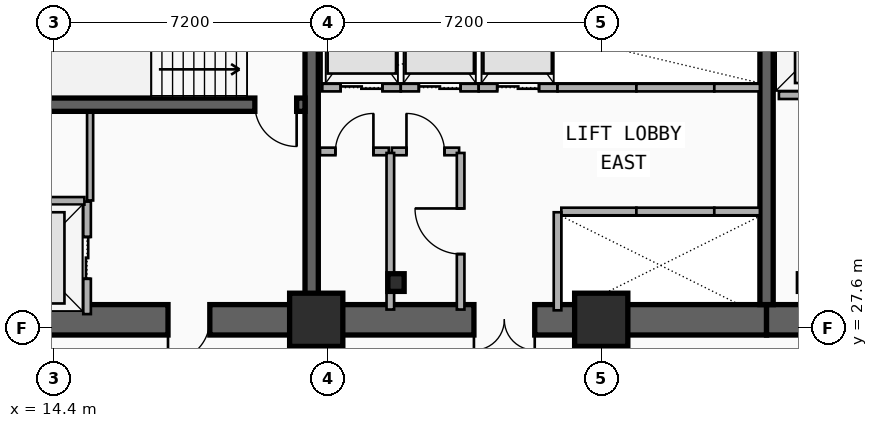
"""IFC4 building model, lengths in metres.
Left out: names, types, materials, properties, quantities, classifications, styles, units other than length and angle.
Written with IfcOpenShell. Run it as: python <this file> out.ifc"""

import sys

from ifc_helpers import new_model, si_unit, direction, frame, frame_2d, origin, origin_2d, place, context, subcontext, project, spatial, rectangle, i_section, extrude, element, fill, save


model = new_model("IFC4")
c1 = context("Model", 3, precision=1e-05, world=origin(), true_north=direction((0.0, 1.0)))
c2 = subcontext(c1, "Body", "Model", "MODEL_VIEW")
j1 = project(units=[si_unit("LENGTHUNIT", "METRE"), si_unit("PLANEANGLEUNIT", "RADIAN")], contexts=[c1])
p1 = place(None, origin())
s1 = spatial("IfcSite", under=j1, at=p1, CompositionType="ELEMENT")
p2 = place(p1, origin())
s2 = spatial("IfcBuilding", under=s1, at=p2, CompositionType="ELEMENT")
p3 = place(p2, frame((0.0, 0.0, 32.5)))
s3 = spatial("IfcBuildingStorey", under=s2, at=p3, CompositionType="ELEMENT", Elevation=32.5)
p4 = place(p3, frame((21.18, 27.82, 0.0), z_axis=(0.0, 0.0, 1.0), x_axis=(-1.0, 0.0, 0.0)))
e1 = element("IfcWall", 1, at=p4, inside=s3, PredefinedType="SHEAR", context=c2, shape_type="SweptSolid", body=[
    extrude(rectangle(XDim=9.03, YDim=0.8, at=frame_2d((4.515, 0.0))), origin(), (0.0, 0.0, 1.0), 3.5),
])
p5 = place(p4, frame((2.68, 0.0, 0.0)))
e2 = element("IfcOpeningElement", 2, at=p5, cuts=e1, PredefinedType="OPENING", context=c2, shape_type="SweptSolid", body=[
    extrude(rectangle(XDim=1.1, YDim=2.15, at=frame_2d((0.55, 1.075))), frame((0.0, 0.41, 0.0), z_axis=(0.0, -1.0, 0.0), x_axis=(1.0, 0.0, 0.0)), (0.0, 0.0, 1.0), 0.82),
])
p6 = place(p3, frame((33.15, 27.82, 0.0), z_axis=(0.0, 0.0, 1.0), x_axis=(-1.0, 0.0, 0.0)))
e3 = element("IfcWall", 3, at=p6, inside=s3, PredefinedType="SHEAR", context=c2, shape_type="SweptSolid", body=[
    extrude(rectangle(XDim=11.97, YDim=0.8, at=frame_2d((5.985, 0.0))), origin(), (0.0, 0.0, 1.0), 3.5),
])
p7 = place(p6, frame((6.1, 0.0, 0.0)))
e4 = element("IfcOpeningElement", 4, at=p7, cuts=e3, PredefinedType="OPENING", context=c2, shape_type="SweptSolid", body=[
    extrude(rectangle(XDim=1.6, YDim=2.2, at=frame_2d((0.8, 1.1))), frame((0.0, 0.41, 0.0), z_axis=(0.0, -1.0, 0.0), x_axis=(1.0, 0.0, 0.0)), (0.0, 0.0, 1.0), 0.82),
])
p8 = place(p3, frame((45.38, 27.82, 0.0), z_axis=(0.0, 0.0, 1.0), x_axis=(-1.0, 0.0, 0.0)))
e5 = element("IfcWall", 5, at=p8, inside=s3, PredefinedType="SHEAR", context=c2, shape_type="SweptSolid", body=[
    extrude(rectangle(XDim=12.23, YDim=0.8, at=frame_2d((6.115, 0.0))), origin(), (0.0, 0.0, 1.0), 3.5),
])
p9 = place(p8, frame((9.93, 0.0, 0.0)))
e6 = element("IfcOpeningElement", 6, at=p9, cuts=e5, PredefinedType="OPENING", context=c2, shape_type="SweptSolid", body=[
    extrude(rectangle(XDim=1.1, YDim=2.15, at=frame_2d((0.55, 1.075))), frame((0.0, 0.41, 0.0), z_axis=(0.0, -1.0, 0.0), x_axis=(1.0, 0.0, 0.0)), (0.0, 0.0, 1.0), 0.82),
])
p10 = place(p8, frame((6.23, 0.0, 0.0)))
e7 = element("IfcOpeningElement", 7, at=p10, cuts=e5, PredefinedType="OPENING", context=c2, shape_type="SweptSolid", body=[
    extrude(rectangle(XDim=1.1, YDim=2.15, at=frame_2d((0.55, 1.075))), frame((0.0, 0.41, 0.0), z_axis=(0.0, -1.0, 0.0), x_axis=(1.0, 0.0, 0.0)), (0.0, 0.0, 1.0), 0.82),
])
for number, where, z_axis, x_axis in (
    (8, (21.18, 28.22, 0.0), (0.0, 0.0, 1.0), (0.0, 1.0, 0.0)),
    (9, (33.15, 28.22, 0.0), (0.0, 0.0, 1.0), (0.0, 1.0, 0.0)),
):
    element("IfcWall", number, at=place(p3, frame(where, z_axis=z_axis, x_axis=x_axis)), inside=s3, PredefinedType="SHEAR", context=c2, shape_type="SweptSolid", body=[
        extrude(rectangle(XDim=8.43, YDim=0.35, at=frame_2d((4.215, 0.0))), origin(), (0.0, 0.0, 1.0), 3.5),
    ])
p11 = place(p3, frame((21.005, 33.48, 0.0), z_axis=(0.0, 0.0, 1.0), x_axis=(-1.0, 0.0, 0.0)))
e10 = element("IfcWall", 10, at=p11, inside=s3, PredefinedType="SHEAR", context=c2, shape_type="SweptSolid", body=[
    extrude(rectangle(XDim=8.455, YDim=0.35, at=frame_2d((4.228, 0.0))), origin(), (0.0, 0.0, 1.0), 3.5),
])
p12 = place(p11, frame((0.22, 0.0, 0.0)))
e11 = element("IfcOpeningElement", 11, at=p12, cuts=e10, PredefinedType="OPENING", context=c2, shape_type="SweptSolid", body=[
    extrude(rectangle(XDim=1.1, YDim=2.15, at=frame_2d((0.55, 1.075))), frame((0.0, 0.185, 0.0), z_axis=(0.0, -1.0, 0.0), x_axis=(1.0, 0.0, 0.0)), (0.0, 0.0, 1.0), 0.37),
])
p13 = place(p3, frame((23.4, 28.8, 0.0), z_axis=(0.0, 0.0, 1.0), x_axis=(1.0, 0.0, 0.0)))
e12 = element("IfcColumn", 12, at=p13, inside=s3, PredefinedType="COLUMN", context=c2, shape_type="SweptSolid", body=[
    extrude(i_section(OverallWidth=0.428, OverallDepth=0.465, WebThickness=0.045, FlangeThickness=0.073, FilletRadius=0.015, at=origin_2d()), origin(), (0.0, 0.0, 1.0), 3.5),
])
for number, where, z_axis, x_axis in (
    (13, (21.3, 27.82, 0.0), (0.0, 0.0, 1.0), (1.0, 0.0, 0.0)),
    (14, (28.8, 27.82, 0.0), (0.0, 0.0, 1.0), (1.0, 0.0, 0.0)),
):
    element("IfcColumn", number, at=place(p3, frame(where, z_axis=z_axis, x_axis=x_axis)), inside=s3, PredefinedType="COLUMN", context=c2, shape_type="SweptSolid", body=[
        extrude(rectangle(XDim=1.4, YDim=1.4, at=origin_2d()), origin(), (0.0, 0.0, 1.0), 3.5),
    ])
p14 = place(p3, frame((15.27, 27.97, 0.0), z_axis=(0.0, 0.0, 1.0), x_axis=(0.0, 1.0, 0.0)))
e15 = element("IfcWall", 15, at=p14, inside=s3, PredefinedType="PARTITIONING", context=c2, shape_type="SweptSolid", body=[
    extrude(rectangle(XDim=2.96, YDim=0.2, at=frame_2d((1.48, 0.0))), origin(), (0.0, 0.0, 1.0), 2.212),
])
p15 = place(p14, frame((0.93, 0.0, 0.0)))
e16 = element("IfcOpeningElement", 16, at=p15, cuts=e15, PredefinedType="OPENING", context=c2, shape_type="SweptSolid", body=[
    extrude(rectangle(XDim=1.1, YDim=2.15, at=frame_2d((0.55, 1.075))), frame((0.0, 0.11, 0.0), z_axis=(0.0, -1.0, 0.0), x_axis=(1.0, 0.0, 0.0)), (0.0, 0.0, 1.0), 0.22),
])
p16 = place(p3, frame((12.45, 30.95, 0.0), z_axis=(0.0, 0.0, 1.0), x_axis=(1.0, 0.0, 0.0)))
e17 = element("IfcWall", 17, at=p16, inside=s3, PredefinedType="PARTITIONING", context=c2, shape_type="SweptSolid", body=[
    extrude(rectangle(XDim=2.75, YDim=0.2, at=frame_2d((1.375, 0.0))), origin(), (0.0, 0.0, 1.0), 2.212),
])
p17 = place(p3, frame((33.475, 33.73, 0.0), z_axis=(0.0, 0.0, 1.0), x_axis=(1.0, 0.0, 0.0)))
e18 = element("IfcWall", 18, at=p17, inside=s3, PredefinedType="PARTITIONING", context=c2, shape_type="SweptSolid", body=[
    extrude(rectangle(XDim=2.725, YDim=0.2, at=frame_2d((1.362, 0.0))), origin(), (0.0, 0.0, 1.0), 2.212),
])
p18 = place(p17, frame((0.812, 0.0, 0.0)))
e19 = element("IfcOpeningElement", 19, at=p18, cuts=e18, PredefinedType="OPENING", context=c2, shape_type="SweptSolid", body=[
    extrude(rectangle(XDim=1.1, YDim=2.15, at=frame_2d((0.55, 1.075))), frame((0.0, 0.11, 0.0), z_axis=(0.0, -1.0, 0.0), x_axis=(1.0, 0.0, 0.0)), (0.0, 0.0, 1.0), 0.22),
])
p19 = place(p3, frame((27.75, 30.67, 0.0), z_axis=(0.0, 0.0, 1.0), x_axis=(1.0, 0.0, 0.0)))
e20 = element("IfcWall", 20, at=p19, inside=s3, PredefinedType="PARTITIONING", context=c2, shape_type="SweptSolid", body=[
    extrude(rectangle(XDim=1.975, YDim=0.2, at=frame_2d((0.988, 0.0))), origin(), (0.0, 0.0, 1.0), 2.212),
])
p20 = place(p3, frame((27.65, 28.07, 0.0), z_axis=(0.0, 0.0, 1.0), x_axis=(0.0, 1.0, 0.0)))
e21 = element("IfcWall", 21, at=p20, inside=s3, PredefinedType="PARTITIONING", context=c2, shape_type="SweptSolid", body=[
    extrude(rectangle(XDim=2.58, YDim=0.2, at=frame_2d((1.29, 0.0))), origin(), (0.0, 0.0, 1.0), 2.212),
])
p21 = place(p3, frame((29.725, 30.67, 0.0), z_axis=(0.0, 0.0, 1.0), x_axis=(1.0, 0.0, 0.0)))
e22 = element("IfcWall", 22, at=p21, inside=s3, PredefinedType="PARTITIONING", context=c2, shape_type="SweptSolid", body=[
    extrude(rectangle(XDim=2.05, YDim=0.2, at=frame_2d((1.025, 0.0))), origin(), (0.0, 0.0, 1.0), 2.62),
])
p22 = place(p3, frame((31.775, 30.67, 0.0), z_axis=(0.0, 0.0, 1.0), x_axis=(1.0, 0.0, 0.0)))
e23 = element("IfcWall", 23, at=p22, inside=s3, PredefinedType="PARTITIONING", context=c2, shape_type="SweptSolid", body=[
    extrude(rectangle(XDim=1.2, YDim=0.2, at=frame_2d((0.6, 0.0))), origin(), (0.0, 0.0, 1.0), 2.62),
])
p23 = place(p3, frame((21.46, 33.93, 0.0), z_axis=(0.0, 0.0, 1.0), x_axis=(1.0, 0.0, 0.0)))
e24 = element("IfcWall", 24, at=p23, inside=s3, PredefinedType="PARTITIONING", context=c2, shape_type="SweptSolid", body=[
    extrude(rectangle(XDim=2.065, YDim=0.2, at=frame_2d((1.032, 0.0))), origin(), (0.0, 0.0, 1.0), 2.212),
])
p24 = place(p23, frame((0.482, 0.0, 0.0)))
e25 = element("IfcOpeningElement", 25, at=p24, cuts=e24, PredefinedType="OPENING", context=c2, shape_type="SweptSolid", body=[
    extrude(rectangle(XDim=1.1, YDim=2.15, at=frame_2d((0.55, 1.075))), frame((0.0, 0.11, 0.0), z_axis=(0.0, -1.0, 0.0), x_axis=(1.0, 0.0, 0.0)), (0.0, 0.0, 1.0), 0.22),
])
p25 = place(p3, frame((23.525, 33.93, 0.0), z_axis=(0.0, 0.0, 1.0), x_axis=(1.0, 0.0, 0.0)))
e26 = element("IfcWall", 26, at=p25, inside=s3, PredefinedType="PARTITIONING", context=c2, shape_type="SweptSolid", body=[
    extrude(rectangle(XDim=2.05, YDim=0.2, at=frame_2d((1.025, 0.0))), origin(), (0.0, 0.0, 1.0), 3.24),
])
p26 = place(p25, frame((0.475, 0.0, 0.0)))
e27 = element("IfcOpeningElement", 27, at=p26, cuts=e26, PredefinedType="OPENING", context=c2, shape_type="SweptSolid", body=[
    extrude(rectangle(XDim=1.1, YDim=2.15, at=frame_2d((0.55, 1.075))), frame((0.0, 0.11, 0.0), z_axis=(0.0, -1.0, 0.0), x_axis=(1.0, 0.0, 0.0)), (0.0, 0.0, 1.0), 0.22),
])
p27 = place(p3, frame((25.575, 33.93, 0.0), z_axis=(0.0, 0.0, 1.0), x_axis=(1.0, 0.0, 0.0)))
e28 = element("IfcWall", 28, at=p27, inside=s3, PredefinedType="PARTITIONING", context=c2, shape_type="SweptSolid", body=[
    extrude(rectangle(XDim=2.075, YDim=0.2, at=frame_2d((1.038, 0.0))), origin(), (0.0, 0.0, 1.0), 3.24),
])
p28 = place(p27, frame((0.488, 0.0, 0.0)))
e29 = element("IfcOpeningElement", 29, at=p28, cuts=e28, PredefinedType="OPENING", context=c2, shape_type="SweptSolid", body=[
    extrude(rectangle(XDim=1.1, YDim=2.15, at=frame_2d((0.55, 1.075))), frame((0.0, 0.11, 0.0), z_axis=(0.0, -1.0, 0.0), x_axis=(1.0, 0.0, 0.0)), (0.0, 0.0, 1.0), 0.22),
])
p29 = place(p3, frame((27.65, 33.93, 0.0), z_axis=(0.0, 0.0, 1.0), x_axis=(1.0, 0.0, 0.0)))
e30 = element("IfcWall", 30, at=p29, inside=s3, PredefinedType="PARTITIONING", context=c2, shape_type="SweptSolid", body=[
    extrude(rectangle(XDim=2.075, YDim=0.2, at=frame_2d((1.038, 0.0))), origin(), (0.0, 0.0, 1.0), 2.212),
])
p30 = place(p3, frame((29.725, 33.93, 0.0), z_axis=(0.0, 0.0, 1.0), x_axis=(1.0, 0.0, 0.0)))
e31 = element("IfcWall", 31, at=p30, inside=s3, PredefinedType="PARTITIONING", context=c2, shape_type="SweptSolid", body=[
    extrude(rectangle(XDim=2.05, YDim=0.2, at=frame_2d((1.025, 0.0))), origin(), (0.0, 0.0, 1.0), 3.24),
])
p31 = place(p3, frame((31.775, 33.93, 0.0), z_axis=(0.0, 0.0, 1.0), x_axis=(1.0, 0.0, 0.0)))
e32 = element("IfcWall", 32, at=p31, inside=s3, PredefinedType="PARTITIONING", context=c2, shape_type="SweptSolid", body=[
    extrude(rectangle(XDim=1.2, YDim=0.2, at=frame_2d((0.6, 0.0))), origin(), (0.0, 0.0, 1.0), 3.24),
])
p32 = place(p3, frame((21.4, 32.25, 0.0), z_axis=(0.0, 0.0, 1.0), x_axis=(1.0, 0.0, 0.0)))
e33 = element("IfcWall", 33, at=p32, inside=s3, PredefinedType="PARTITIONING", context=c2, shape_type="SweptSolid", body=[
    extrude(rectangle(XDim=1.81, YDim=0.2, at=frame_2d((0.905, 0.0))), origin(), (0.0, 0.0, 1.0), 2.28),
])
p33 = place(p32, frame((0.405, 0.0, 0.0)))
e34 = element("IfcOpeningElement", 34, at=p33, cuts=e33, PredefinedType="OPENING", context=c2, shape_type="SweptSolid", body=[
    extrude(rectangle(XDim=1.0, YDim=2.15, at=frame_2d((0.5, 1.075))), frame((0.0, 0.11, 0.0), z_axis=(0.0, -1.0, 0.0), x_axis=(1.0, 0.0, 0.0)), (0.0, 0.0, 1.0), 0.22),
])
p34 = place(p3, frame((23.29, 32.25, 0.0), z_axis=(0.0, 0.0, 1.0), x_axis=(1.0, 0.0, 0.0)))
e35 = element("IfcWall", 35, at=p34, inside=s3, PredefinedType="PARTITIONING", context=c2, shape_type="SweptSolid", body=[
    extrude(rectangle(XDim=1.77, YDim=0.2, at=frame_2d((0.885, 0.0))), origin(), (0.0, 0.0, 1.0), 3.24),
])
p35 = place(p34, frame((0.385, 0.0, 0.0)))
e36 = element("IfcOpeningElement", 36, at=p35, cuts=e35, PredefinedType="OPENING", context=c2, shape_type="SweptSolid", body=[
    extrude(rectangle(XDim=1.0, YDim=2.15, at=frame_2d((0.5, 1.075))), frame((0.0, 0.11, 0.0), z_axis=(0.0, -1.0, 0.0), x_axis=(1.0, 0.0, 0.0)), (0.0, 0.0, 1.0), 0.22),
])
p36 = place(p3, frame((25.1, 28.09, 0.0), z_axis=(0.0, 0.0, 1.0), x_axis=(0.0, 1.0, 0.0)))
e37 = element("IfcWall", 37, at=p36, inside=s3, PredefinedType="PARTITIONING", context=c2, shape_type="SweptSolid", body=[
    extrude(rectangle(XDim=4.12, YDim=0.2, at=frame_2d((2.06, 0.0))), origin(), (0.0, 0.0, 1.0), 2.62),
])
p37 = place(p36, frame((1.46, 0.0, 0.0)))
e38 = element("IfcOpeningElement", 38, at=p37, cuts=e37, PredefinedType="OPENING", context=c2, shape_type="SweptSolid", body=[
    extrude(rectangle(XDim=1.2, YDim=2.15, at=frame_2d((0.6, 1.075))), frame((0.0, 0.11, 0.0), z_axis=(0.0, -1.0, 0.0), x_axis=(1.0, 0.0, 0.0)), (0.0, 0.0, 1.0), 0.22),
])
p38 = place(p3, frame((23.25, 28.09, 0.0), z_axis=(0.0, 0.0, 1.0), x_axis=(0.0, 1.0, 0.0)))
e39 = element("IfcWall", 39, at=p38, inside=s3, PredefinedType="PARTITIONING", context=c2, shape_type="SweptSolid", body=[
    extrude(rectangle(XDim=4.12, YDim=0.2, at=frame_2d((2.06, 0.0))), origin(), (0.0, 0.0, 1.0), 2.62),
])
p39 = place(p3, frame((15.35, 30.96, 0.0), z_axis=(0.0, 0.0, 1.0), x_axis=(0.0, 1.0, 0.0)))
e40 = element("IfcWall", 40, at=p39, inside=s3, PredefinedType="PARTITIONING", context=c2, shape_type="SweptSolid", body=[
    extrude(rectangle(XDim=2.31, YDim=0.16, at=frame_2d((1.155, 0.0))), origin(), (0.0, 0.0, 1.0), 3.24),
])
p40 = place(p15, origin())
e41 = element("IfcDoor", 41, at=p40, inside=s3, OperationType="DOUBLE_DOOR_SLIDING", PredefinedType="DOOR", context=c2, shape_type="SweptSolid", body=[
    extrude(rectangle(XDim=1.1, YDim=2.15, at=frame_2d((0.55, 1.075))), frame((0.0, 0.025, 0.0), z_axis=(0.0, -1.0, 0.0), x_axis=(1.0, 0.0, 0.0)), (0.0, 0.0, 1.0), 0.05),
])
fill(e16, e41)
p41 = place(p24, origin())
e42 = element("IfcDoor", 42, at=p41, inside=s3, OperationType="DOUBLE_DOOR_SLIDING", PredefinedType="DOOR", context=c2, shape_type="SweptSolid", body=[
    extrude(rectangle(XDim=1.1, YDim=2.15, at=frame_2d((0.55, 1.075))), frame((0.0, 0.025, 0.0), z_axis=(0.0, -1.0, 0.0), x_axis=(1.0, 0.0, 0.0)), (0.0, 0.0, 1.0), 0.05),
])
fill(e25, e42)
p42 = place(p26, origin())
e43 = element("IfcDoor", 43, at=p42, inside=s3, OperationType="DOUBLE_DOOR_SLIDING", PredefinedType="DOOR", context=c2, shape_type="SweptSolid", body=[
    extrude(rectangle(XDim=1.1, YDim=2.15, at=frame_2d((0.55, 1.075))), frame((0.0, 0.025, 0.0), z_axis=(0.0, -1.0, 0.0), x_axis=(1.0, 0.0, 0.0)), (0.0, 0.0, 1.0), 0.05),
])
fill(e27, e43)
p43 = place(p28, origin())
e44 = element("IfcDoor", 44, at=p43, inside=s3, OperationType="DOUBLE_DOOR_SLIDING", PredefinedType="DOOR", context=c2, shape_type="SweptSolid", body=[
    extrude(rectangle(XDim=1.1, YDim=2.15, at=frame_2d((0.55, 1.075))), frame((0.0, 0.025, 0.0), z_axis=(0.0, -1.0, 0.0), x_axis=(1.0, 0.0, 0.0)), (0.0, 0.0, 1.0), 0.05),
])
fill(e29, e44)
p44 = place(p12, origin())
e45 = element("IfcDoor", 45, at=p44, inside=s3, OperationType="SINGLE_SWING_LEFT", PredefinedType="DOOR", context=c2, shape_type="SweptSolid", body=[
    extrude(rectangle(XDim=1.1, YDim=2.15, at=frame_2d((0.55, 1.075))), frame((0.0, 0.025, 0.0), z_axis=(0.0, -1.0, 0.0), x_axis=(1.0, 0.0, 0.0)), (0.0, 0.0, 1.0), 0.05),
])
fill(e11, e45)
p45 = place(p5, origin())
e46 = element("IfcDoor", 46, at=p45, inside=s3, OperationType="SINGLE_SWING_RIGHT", PredefinedType="DOOR", context=c2, shape_type="SweptSolid", body=[
    extrude(rectangle(XDim=1.1, YDim=2.15, at=frame_2d((0.55, 1.075))), frame((0.0, 0.025, 0.0), z_axis=(0.0, -1.0, 0.0), x_axis=(1.0, 0.0, 0.0)), (0.0, 0.0, 1.0), 0.05),
])
fill(e2, e46)
p46 = place(p7, origin())
e47 = element("IfcDoor", 47, at=p46, inside=s3, OperationType="SINGLE_SWING_LEFT", PredefinedType="DOOR", context=c2, shape_type="SweptSolid", body=[
    extrude(rectangle(XDim=1.6, YDim=2.2, at=frame_2d((0.8, 1.1))), frame((0.0, 0.025, 0.0), z_axis=(0.0, -1.0, 0.0), x_axis=(1.0, 0.0, 0.0)), (0.0, 0.0, 1.0), 0.05),
])
fill(e4, e47)
p47 = place(p33, origin())
e48 = element("IfcDoor", 48, at=p47, inside=s3, OperationType="SINGLE_SWING_RIGHT", PredefinedType="DOOR", context=c2, shape_type="SweptSolid", body=[
    extrude(rectangle(XDim=1.0, YDim=2.15, at=frame_2d((0.5, 1.075))), frame((0.0, 0.025, 0.0), z_axis=(0.0, -1.0, 0.0), x_axis=(1.0, 0.0, 0.0)), (0.0, 0.0, 1.0), 0.05),
])
fill(e34, e48)
p48 = place(p35, origin())
e49 = element("IfcDoor", 49, at=p48, inside=s3, OperationType="SINGLE_SWING_LEFT", PredefinedType="DOOR", context=c2, shape_type="SweptSolid", body=[
    extrude(rectangle(XDim=1.0, YDim=2.15, at=frame_2d((0.5, 1.075))), frame((0.0, 0.025, 0.0), z_axis=(0.0, -1.0, 0.0), x_axis=(1.0, 0.0, 0.0)), (0.0, 0.0, 1.0), 0.05),
])
fill(e36, e49)
p49 = place(p37, origin())
e50 = element("IfcDoor", 50, at=p49, inside=s3, OperationType="SINGLE_SWING_RIGHT", PredefinedType="DOOR", context=c2, shape_type="SweptSolid", body=[
    extrude(rectangle(XDim=1.2, YDim=2.15, at=frame_2d((0.6, 1.075))), frame((0.0, 0.025, 0.0), z_axis=(0.0, -1.0, 0.0), x_axis=(1.0, 0.0, 0.0)), (0.0, 0.0, 1.0), 0.05),
])
fill(e38, e50)
save(model, sys.argv[1])
